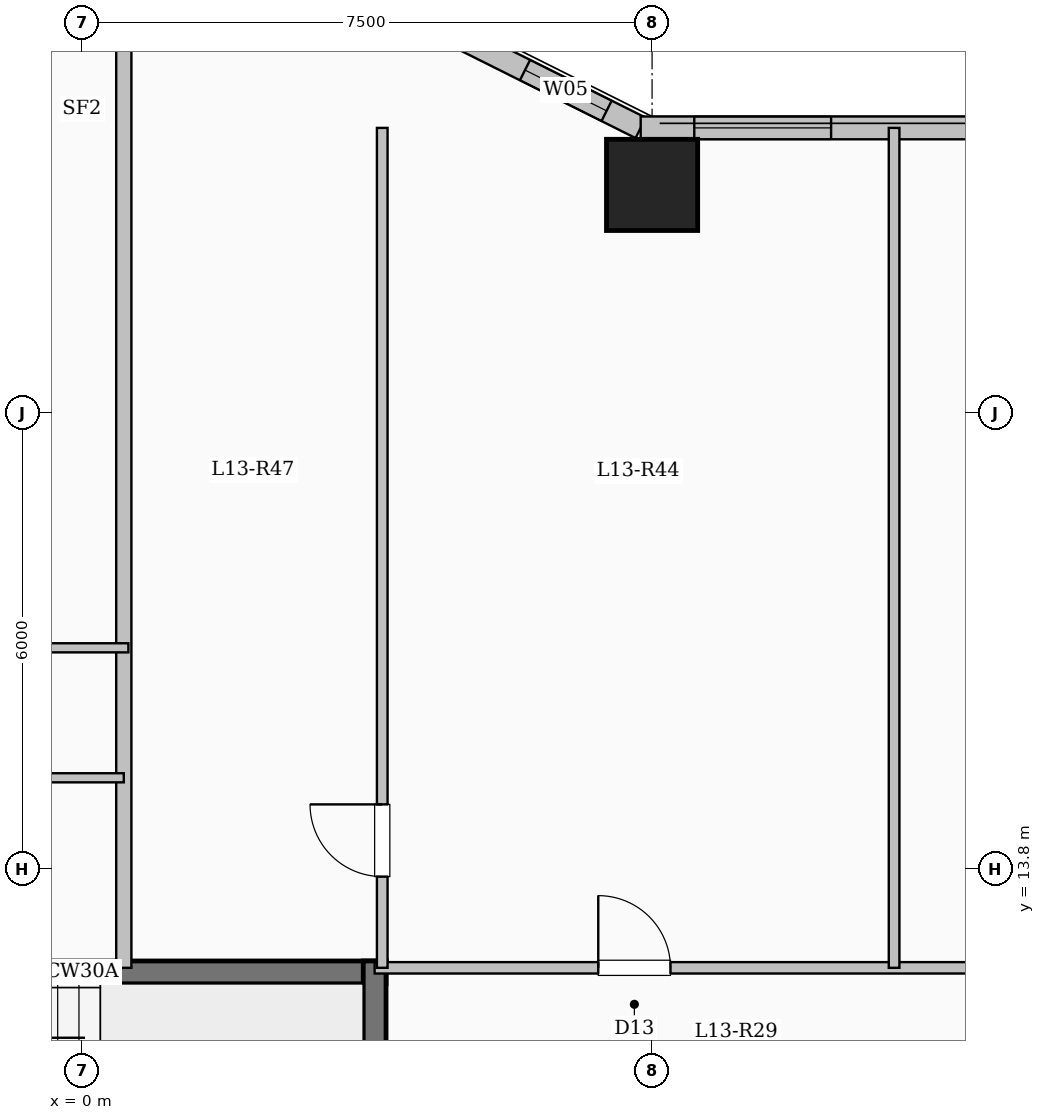
"""IFC4 building model, lengths in metres.
Left out: names, types, materials, properties, quantities, classifications, styles, units other than length and angle.
Written with IfcOpenShell. Run it as: python <this file> out.ifc"""

import sys

from ifc_helpers import new_model, si_unit, direction, frame, frame_2d, origin, origin_2d, place, context, subcontext, project, spatial, rectangle, extrude, element, fill, save


model = new_model("IFC4")
c1 = context("Model", 3, precision=1e-05, world=origin(), true_north=direction((0.0, 1.0)))
c2 = subcontext(c1, "Body", "Model", "MODEL_VIEW")
j1 = project(units=[si_unit("LENGTHUNIT", "METRE"), si_unit("PLANEANGLEUNIT", "RADIAN")], contexts=[c1])
p1 = place(None, origin())
s1 = spatial("IfcSite", under=j1, at=p1, CompositionType="ELEMENT")
p2 = place(p1, origin())
s2 = spatial("IfcBuilding", under=s1, at=p2, CompositionType="ELEMENT")
p3 = place(p2, frame((0.0, 0.0, 50.8)))
s3 = spatial("IfcBuildingStorey", under=s2, at=p3, CompositionType="ELEMENT", Elevation=50.8)
p4 = place(p3, frame((7.5, 22.8, 0.0), z_axis=(0.0, 0.0, 1.0), x_axis=(1.0, 0.0, 0.0)))
e1 = element("IfcColumn", 1, at=p4, inside=s3, PredefinedType="COLUMN", context=c2, shape_type="SweptSolid", body=[
    extrude(rectangle(XDim=1.2, YDim=1.2, at=origin_2d()), origin(), (0.0, 0.0, 1.0), 3.35),
])
p5 = place(p3, frame((4.35, 25.05, 0.0), z_axis=(0.0, 0.0, 1.0), x_axis=(0.894427191, -0.4472135955, 0.0)))
e2 = element("IfcWall", 2, at=p5, inside=s3, PredefinedType="SOLIDWALL", context=c2, shape_type="SweptSolid", body=[
    extrude(rectangle(XDim=3.354, YDim=0.3, at=frame_2d((1.677, 0.0))), origin(), (0.0, 0.0, 1.0), 3.1),
])
p6 = place(p5, frame((1.653, 0.0, 0.95)))
e3 = element("IfcOpeningElement", 3, at=p6, cuts=e2, PredefinedType="OPENING", context=c2, shape_type="SweptSolid", body=[
    extrude(rectangle(XDim=1.2, YDim=1.5, at=frame_2d((0.6, 0.75))), frame((0.0, 0.16, 0.0), z_axis=(0.0, -1.0, 0.0), x_axis=(1.0, 0.0, 0.0)), (0.0, 0.0, 1.0), 0.32),
])
p7 = place(p3, frame((7.35, 23.55, 0.0), z_axis=(0.0, 0.0, 1.0), x_axis=(1.0, 0.0, 0.0)))
e4 = element("IfcWall", 4, at=p7, inside=s3, PredefinedType="SOLIDWALL", context=c2, shape_type="SweptSolid", body=[
    extrude(rectangle(XDim=15.3, YDim=0.3, at=frame_2d((7.65, 0.0))), origin(), (0.0, 0.0, 1.0), 3.1),
])
p8 = place(p7, frame((0.705, 0.0, 0.9)))
e5 = element("IfcOpeningElement", 5, at=p8, cuts=e4, PredefinedType="OPENING", context=c2, shape_type="SweptSolid", body=[
    extrude(rectangle(XDim=1.8, YDim=1.65, at=frame_2d((0.9, 0.825))), frame((0.0, 0.16, 0.0), z_axis=(0.0, -1.0, 0.0), x_axis=(1.0, 0.0, 0.0)), (0.0, 0.0, 1.0), 0.32),
])
p9 = place(p7, frame((5.772, 0.0, 0.9)))
e6 = element("IfcOpeningElement", 6, at=p9, cuts=e4, PredefinedType="OPENING", context=c2, shape_type="SweptSolid", body=[
    extrude(rectangle(XDim=1.8, YDim=1.65, at=frame_2d((0.9, 0.825))), frame((0.0, 0.16, 0.0), z_axis=(0.0, -1.0, 0.0), x_axis=(1.0, 0.0, 0.0)), (0.0, 0.0, 1.0), 0.32),
])
p10 = place(p3, frame((-4.0, 12.44, 0.0), z_axis=(0.0, 0.0, 1.0), x_axis=(1.0, 0.0, 0.0)))
e7 = element("IfcWall", 7, at=p10, inside=s3, PredefinedType="SHEAR", context=c2, shape_type="SweptSolid", body=[
    extrude(rectangle(XDim=8.0, YDim=0.3, at=frame_2d((4.0, 0.0))), origin(), (0.0, 0.0, 1.0), 3.35),
])
p11 = place(p3, frame((3.85, 9.0, 0.0), z_axis=(0.0, 0.0, 1.0), x_axis=(0.0, 1.0, 0.0)))
e8 = element("IfcWall", 8, at=p11, inside=s3, PredefinedType="SHEAR", context=c2, shape_type="SweptSolid", body=[
    extrude(rectangle(XDim=3.59, YDim=0.3, at=frame_2d((1.795, 0.0))), origin(), (0.0, 0.0, 1.0), 3.35),
])
p12 = place(p3, frame((3.85, 12.5, 0.0), z_axis=(0.0, 0.0, 1.0), x_axis=(1.0, 0.0, 0.0)))
e9 = element("IfcWall", 9, at=p12, inside=s3, PredefinedType="PARTITIONING", context=c2, shape_type="SweptSolid", body=[
    extrude(rectangle(XDim=18.7, YDim=0.15, at=frame_2d((9.35, 0.0))), origin(), (0.0, 0.0, 1.0), 3.1),
])
p13 = place(p12, frame((2.942, 0.0, 0.0)))
e10 = element("IfcOpeningElement", 10, at=p13, cuts=e9, PredefinedType="OPENING", context=c2, shape_type="SweptSolid", body=[
    extrude(rectangle(XDim=0.95, YDim=2.15, at=frame_2d((0.475, 1.075))), frame((0.0, 0.085, 0.0), z_axis=(0.0, -1.0, 0.0), x_axis=(1.0, 0.0, 0.0)), (0.0, 0.0, 1.0), 0.17),
])
p14 = place(p12, frame((9.647, 0.0, 0.0)))
e11 = element("IfcOpeningElement", 11, at=p14, cuts=e9, PredefinedType="OPENING", context=c2, shape_type="SweptSolid", body=[
    extrude(rectangle(XDim=0.95, YDim=2.15, at=frame_2d((0.475, 1.075))), frame((0.0, 0.085, 0.0), z_axis=(0.0, -1.0, 0.0), x_axis=(1.0, 0.0, 0.0)), (0.0, 0.0, 1.0), 0.17),
])
p15 = place(p12, frame((15.61, 0.0, 0.0)))
e12 = element("IfcOpeningElement", 12, at=p15, cuts=e9, PredefinedType="OPENING", context=c2, shape_type="SweptSolid", body=[
    extrude(rectangle(XDim=0.95, YDim=2.15, at=frame_2d((0.475, 1.075))), frame((0.0, 0.085, 0.0), z_axis=(0.0, -1.0, 0.0), x_axis=(1.0, 0.0, 0.0)), (0.0, 0.0, 1.0), 0.17),
])
p16 = place(p3, frame((0.55, 12.5, 0.0), z_axis=(0.0, 0.0, 1.0), x_axis=(0.0, 1.0, 0.0)))
e13 = element("IfcWall", 13, at=p16, inside=s3, PredefinedType="SOLIDWALL", context=c2, shape_type="SweptSolid", body=[
    extrude(rectangle(XDim=12.58, YDim=0.2, at=frame_2d((6.29, 0.0))), origin(), (0.0, 0.0, 1.0), 3.1),
])
p17 = place(p3, frame((-6.807, 15.0, 0.0), z_axis=(0.0, 0.0, 1.0), x_axis=(1.0, 0.0, 0.0)))
e14 = element("IfcWall", 14, at=p17, inside=s3, PredefinedType="PARTITIONING", context=c2, shape_type="SweptSolid", body=[
    extrude(rectangle(XDim=7.357, YDim=0.12, at=frame_2d((3.678, 0.0))), origin(), (0.0, 0.0, 1.0), 2.585),
])
p18 = place(p17, frame((3.239, 0.0, 0.0)))
e15 = element("IfcOpeningElement", 15, at=p18, cuts=e14, PredefinedType="OPENING", context=c2, shape_type="SweptSolid", body=[
    extrude(rectangle(XDim=0.88, YDim=2.1, at=frame_2d((0.44, 1.05))), frame((0.0, 0.07, 0.0), z_axis=(0.0, -1.0, 0.0), x_axis=(1.0, 0.0, 0.0)), (0.0, 0.0, 1.0), 0.14),
])
p19 = place(p3, frame((-15.095, 16.71, 0.0), z_axis=(0.0, 0.0, 1.0), x_axis=(1.0, 0.0, 0.0)))
e16 = element("IfcWall", 16, at=p19, inside=s3, PredefinedType="PARTITIONING", context=c2, shape_type="SweptSolid", body=[
    extrude(rectangle(XDim=15.705, YDim=0.12, at=frame_2d((7.853, 0.0))), origin(), (0.0, 0.0, 1.0), 2.585),
])
p20 = place(p19, frame((1.501, 0.0, 0.0)))
e17 = element("IfcOpeningElement", 17, at=p20, cuts=e16, PredefinedType="OPENING", context=c2, shape_type="SweptSolid", body=[
    extrude(rectangle(XDim=0.88, YDim=2.1, at=frame_2d((0.44, 1.05))), frame((0.0, 0.07, 0.0), z_axis=(0.0, -1.0, 0.0), x_axis=(1.0, 0.0, 0.0)), (0.0, 0.0, 1.0), 0.14),
])
p21 = place(p19, frame((5.382, 0.0, 0.0)))
e18 = element("IfcOpeningElement", 18, at=p21, cuts=e16, PredefinedType="OPENING", context=c2, shape_type="SweptSolid", body=[
    extrude(rectangle(XDim=0.88, YDim=2.1, at=frame_2d((0.44, 1.05))), frame((0.0, 0.07, 0.0), z_axis=(0.0, -1.0, 0.0), x_axis=(1.0, 0.0, 0.0)), (0.0, 0.0, 1.0), 0.14),
])
p22 = place(p19, frame((9.263, 0.0, 0.0)))
e19 = element("IfcOpeningElement", 19, at=p22, cuts=e16, PredefinedType="OPENING", context=c2, shape_type="SweptSolid", body=[
    extrude(rectangle(XDim=0.88, YDim=2.1, at=frame_2d((0.44, 1.05))), frame((0.0, 0.07, 0.0), z_axis=(0.0, -1.0, 0.0), x_axis=(1.0, 0.0, 0.0)), (0.0, 0.0, 1.0), 0.14),
])
p23 = place(p19, frame((13.144, 0.0, 0.0)))
e20 = element("IfcOpeningElement", 20, at=p23, cuts=e16, PredefinedType="OPENING", context=c2, shape_type="SweptSolid", body=[
    extrude(rectangle(XDim=0.88, YDim=2.1, at=frame_2d((0.44, 1.05))), frame((0.0, 0.07, 0.0), z_axis=(0.0, -1.0, 0.0), x_axis=(1.0, 0.0, 0.0)), (0.0, 0.0, 1.0), 0.14),
])
p24 = place(p3, frame((3.95, 12.5, 0.0), z_axis=(0.0, 0.0, 1.0), x_axis=(0.0, 1.0, 0.0)))
e21 = element("IfcWall", 21, at=p24, inside=s3, PredefinedType="PARTITIONING", context=c2, shape_type="SweptSolid", body=[
    extrude(rectangle(XDim=11.05, YDim=0.14, at=frame_2d((5.525, 0.0))), origin(), (0.0, 0.0, 1.0), 3.1),
])
p25 = place(p24, frame((1.2, 0.0, 0.0)))
e22 = element("IfcOpeningElement", 22, at=p25, cuts=e21, PredefinedType="OPENING", context=c2, shape_type="SweptSolid", body=[
    extrude(rectangle(XDim=0.95, YDim=2.15, at=frame_2d((0.475, 1.075))), frame((0.0, 0.08, 0.0), z_axis=(0.0, -1.0, 0.0), x_axis=(1.0, 0.0, 0.0)), (0.0, 0.0, 1.0), 0.16),
])
p26 = place(p3, frame((10.684, 12.5, 0.0), z_axis=(0.0, 0.0, 1.0), x_axis=(0.0, 1.0, 0.0)))
e23 = element("IfcWall", 23, at=p26, inside=s3, PredefinedType="PARTITIONING", context=c2, shape_type="SweptSolid", body=[
    extrude(rectangle(XDim=11.05, YDim=0.14, at=frame_2d((5.525, 0.0))), origin(), (0.0, 0.0, 1.0), 3.1),
])
p27 = place(p6, origin())
e24 = element("IfcWindow", 24, at=p27, inside=s3, PartitioningType="SINGLE_PANEL", PredefinedType="WINDOW", context=c2, shape_type="SweptSolid", body=[
    extrude(rectangle(XDim=1.2, YDim=1.5, at=frame_2d((0.6, 0.75))), frame((0.0, 0.03, 0.0), z_axis=(0.0, -1.0, 0.0), x_axis=(1.0, 0.0, 0.0)), (0.0, 0.0, 1.0), 0.06),
])
fill(e3, e24)
p28 = place(p8, origin())
e25 = element("IfcWindow", 25, at=p28, inside=s3, PartitioningType="SINGLE_PANEL", PredefinedType="WINDOW", context=c2, shape_type="SweptSolid", body=[
    extrude(rectangle(XDim=1.8, YDim=1.65, at=frame_2d((0.9, 0.825))), frame((0.0, 0.03, 0.0), z_axis=(0.0, -1.0, 0.0), x_axis=(1.0, 0.0, 0.0)), (0.0, 0.0, 1.0), 0.06),
])
fill(e5, e25)
p29 = place(p13, origin())
e26 = element("IfcDoor", 26, at=p29, inside=s3, OperationType="SINGLE_SWING_LEFT", PredefinedType="DOOR", context=c2, shape_type="SweptSolid", body=[
    extrude(rectangle(XDim=0.95, YDim=2.15, at=frame_2d((0.475, 1.075))), frame((0.0, 0.025, 0.0), z_axis=(0.0, -1.0, 0.0), x_axis=(1.0, 0.0, 0.0)), (0.0, 0.0, 1.0), 0.05),
])
fill(e10, e26)
p30 = place(p25, origin())
e27 = element("IfcDoor", 27, at=p30, inside=s3, OperationType="SINGLE_SWING_RIGHT", PredefinedType="DOOR", context=c2, shape_type="SweptSolid", body=[
    extrude(rectangle(XDim=0.95, YDim=2.15, at=frame_2d((0.475, 1.075))), frame((0.0, 0.025, 0.0), z_axis=(0.0, -1.0, 0.0), x_axis=(1.0, 0.0, 0.0)), (0.0, 0.0, 1.0), 0.05),
])
fill(e22, e27)
save(model, sys.argv[1])
